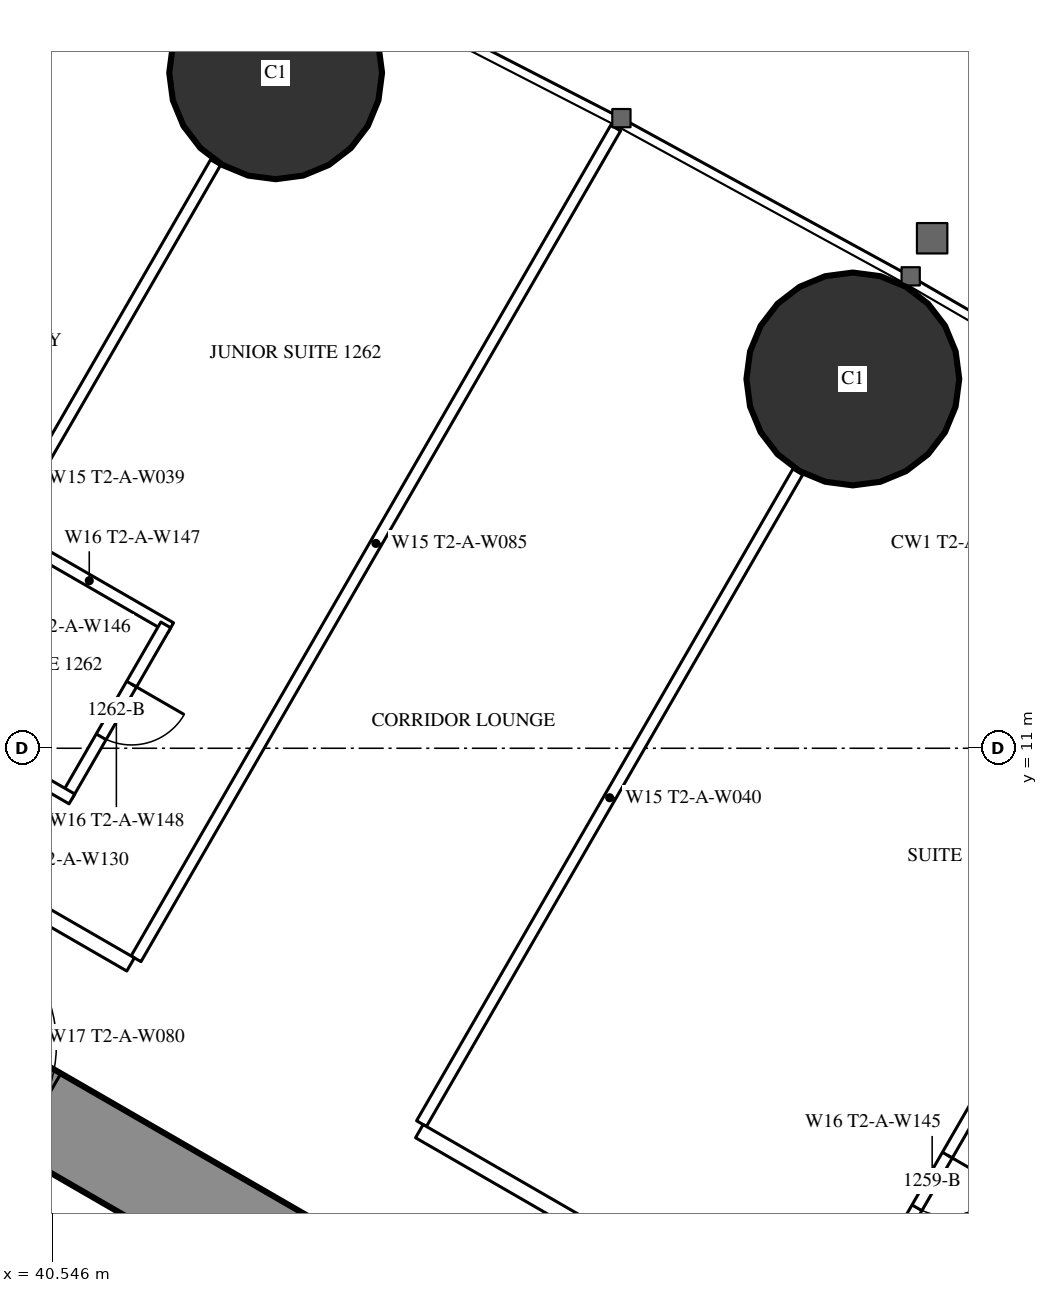
"""IFC4 building model, lengths in metres.
Left out: names, types, materials, properties, quantities, classifications, styles, units other than length and angle.
Written with IfcOpenShell. Run it as: python <this file> out.ifc"""

import sys

from ifc_helpers import new_model, si_unit, direction, frame, frame_2d, origin, origin_2d, place, context, subcontext, project, spatial, rectangle, hollow_circle, extrude, element, fill, save


model = new_model("IFC4")
c1 = context("Model", 3, precision=1e-05, world=origin(), true_north=direction((0.0, 1.0)))
c2 = subcontext(c1, "Body", "Model", "MODEL_VIEW")
j1 = project(units=[si_unit("LENGTHUNIT", "METRE"), si_unit("PLANEANGLEUNIT", "RADIAN")], contexts=[c1])
p1 = place(None, origin())
s1 = spatial("IfcSite", under=j1, at=p1, CompositionType="ELEMENT")
p2 = place(p1, origin())
s2 = spatial("IfcBuilding", under=s1, at=p2, CompositionType="ELEMENT")
p3 = place(p2, frame((0.0, 0.0, 49.5)))
s3 = spatial("IfcBuildingStorey", under=s2, at=p3, CompositionType="ELEMENT", Elevation=49.5)
for number, where, z_axis, x_axis in (
    (1, (51.078, 15.858, 0.0), (0.0, 0.0, 1.0), (1.0, 0.0, 0.0)),
    (2, (43.484, 19.886, 0.0), (0.0, 0.0, 1.0), (1.0, 0.0, 0.0)),
):
    element("IfcColumn", number, at=place(p3, frame(where, z_axis=z_axis, x_axis=x_axis)), inside=s3, PredefinedType="COLUMN", context=c2, shape_type="SweptSolid", body=[
        extrude(hollow_circle(Radius=1.4, WallThickness=0.12, at=origin_2d()), origin(), (0.0, 0.0, 1.0), 3.5),
    ])
p4 = place(p3, frame((27.2, 13.8, 0.0), z_axis=(0.0, 0.0, 1.0), x_axis=(0.866024515034, -0.500001539357, 0.0)))
e3 = element("IfcWall", 3, at=p4, inside=s3, PredefinedType="SHEAR", context=c2, shape_type="SweptSolid", body=[
    extrude(rectangle(XDim=26.907, YDim=1.2, at=frame_2d((13.454, 0.0))), origin(), (0.0, 0.0, 1.0), 3.5),
])
p5 = place(p4, frame((4.6, 0.0, 0.0)))
e4 = element("IfcOpeningElement", 4, at=p5, cuts=e3, PredefinedType="OPENING", context=c2, shape_type="SweptSolid", body=[
    extrude(rectangle(XDim=1.0, YDim=2.2, at=frame_2d((0.5, 1.1))), frame((0.0, 0.61, 0.0), z_axis=(0.0, -1.0, 0.0), x_axis=(1.0, 0.0, 0.0)), (0.0, 0.0, 1.0), 1.22),
])
p6 = place(p4, frame((13.395, 0.0, 0.0)))
e5 = element("IfcOpeningElement", 5, at=p6, cuts=e3, PredefinedType="OPENING", context=c2, shape_type="SweptSolid", body=[
    extrude(rectangle(XDim=1.8, YDim=2.2, at=frame_2d((0.9, 1.1))), frame((0.0, 0.61, 0.0), z_axis=(0.0, -1.0, 0.0), x_axis=(1.0, 0.0, 0.0)), (0.0, 0.0, 1.0), 1.22),
])
p7 = place(p3, frame((37.895, 10.396, 0.0), z_axis=(0.0, 0.0, 1.0), x_axis=(0.499995616528, 0.866027934568, 0.0)))
e6 = element("IfcWall", 6, at=p7, inside=s3, PredefinedType="PARTITIONING", context=c2, shape_type="SweptSolid", body=[
    extrude(rectangle(XDim=9.593, YDim=0.15, at=frame_2d((4.797, 0.0))), origin(), (0.0, 0.0, 1.0), 2.25),
])
p8 = place(p3, frame((41.647, 8.23, 0.0), z_axis=(0.0, 0.0, 1.0), x_axis=(0.49998590462, 0.866033541603, 0.0)))
e7 = element("IfcWall", 7, at=p8, inside=s3, PredefinedType="PARTITIONING", context=c2, shape_type="SweptSolid", body=[
    extrude(rectangle(XDim=12.621, YDim=0.15, at=frame_2d((6.311, 0.0))), origin(), (0.0, 0.0, 1.0), 3.25),
])
p9 = place(p3, frame((45.403, 6.062, 0.0), z_axis=(0.0, 0.0, 1.0), x_axis=(0.500013434677, 0.866017647131, 0.0)))
e8 = element("IfcWall", 8, at=p9, inside=s3, PredefinedType="PARTITIONING", context=c2, shape_type="SweptSolid", body=[
    extrude(rectangle(XDim=9.902, YDim=0.15, at=frame_2d((4.951, 0.0))), origin(), (0.0, 0.0, 1.0), 2.25),
])
p10 = place(p3, frame((36.834, 10.894, 0.0), z_axis=(0.0, 0.0, 1.0), x_axis=(0.866031136856, -0.499990069898, 0.0)))
e9 = element("IfcWall", 9, at=p10, inside=s3, PredefinedType="PARTITIONING", context=c2, shape_type="SweptSolid", body=[
    extrude(rectangle(XDim=5.475, YDim=0.2, at=frame_2d((2.738, 0.0))), origin(), (0.0, 0.0, 1.0), 3.25),
])
p11 = place(p10, frame((1.542, 0.0, 0.0)))
e10 = element("IfcOpeningElement", 10, at=p11, cuts=e9, PredefinedType="OPENING", context=c2, shape_type="SweptSolid", body=[
    extrude(rectangle(XDim=0.95, YDim=2.2, at=frame_2d((0.475, 1.1))), frame((0.0, 0.11, 0.0), z_axis=(0.0, -1.0, 0.0), x_axis=(1.0, 0.0, 0.0)), (0.0, 0.0, 1.0), 0.22),
])
p12 = place(p10, frame((0.246, 0.0, 0.0)))
e11 = element("IfcOpeningElement", 11, at=p12, cuts=e9, PredefinedType="OPENING", context=c2, shape_type="SweptSolid", body=[
    extrude(rectangle(XDim=0.9, YDim=2.2, at=frame_2d((0.45, 1.1))), frame((0.0, 0.11, 0.0), z_axis=(0.0, -1.0, 0.0), x_axis=(1.0, 0.0, 0.0)), (0.0, 0.0, 1.0), 0.22),
])
p13 = place(p3, frame((45.375, 5.963, 0.0), z_axis=(0.0, 0.0, 1.0), x_axis=(0.86603164725, -0.499989185844, 0.0)))
e12 = element("IfcWall", 12, at=p13, inside=s3, PredefinedType="PARTITIONING", context=c2, shape_type="SweptSolid", body=[
    extrude(rectangle(XDim=11.805, YDim=0.2, at=frame_2d((5.903, 0.0))), origin(), (0.0, 0.0, 1.0), 3.25),
])
p14 = place(p13, frame((9.024, 0.0, 0.0)))
e13 = element("IfcOpeningElement", 13, at=p14, cuts=e12, PredefinedType="OPENING", context=c2, shape_type="SweptSolid", body=[
    extrude(rectangle(XDim=0.95, YDim=2.2, at=frame_2d((0.475, 1.1))), frame((0.0, 0.11, 0.0), z_axis=(0.0, -1.0, 0.0), x_axis=(1.0, 0.0, 0.0)), (0.0, 0.0, 1.0), 0.22),
])
p15 = place(p13, frame((7.324, 0.0, 0.0)))
e14 = element("IfcOpeningElement", 14, at=p15, cuts=e12, PredefinedType="OPENING", context=c2, shape_type="SweptSolid", body=[
    extrude(rectangle(XDim=0.95, YDim=2.2, at=frame_2d((0.475, 1.1))), frame((0.0, 0.11, 0.0), z_axis=(0.0, -1.0, 0.0), x_axis=(1.0, 0.0, 0.0)), (0.0, 0.0, 1.0), 0.22),
])
p16 = place(p3, frame((51.471, 4.175, 0.0), z_axis=(0.0, 0.0, 1.0), x_axis=(0.500006934395, 0.866021400173, 0.0)))
e15 = element("IfcWall", 15, at=p16, inside=s3, PredefinedType="PARTITIONING", context=c2, shape_type="SweptSolid", body=[
    extrude(rectangle(XDim=2.6, YDim=0.15, at=frame_2d((1.3, 0.0))), origin(), (0.0, 0.0, 1.0), 3.25),
])
p17 = place(p16, frame((0.9, 0.0, 0.0)))
e16 = element("IfcOpeningElement", 16, at=p17, cuts=e15, PredefinedType="OPENING", context=c2, shape_type="SweptSolid", body=[
    extrude(rectangle(XDim=0.8, YDim=2.2, at=frame_2d((0.4, 1.1))), frame((0.0, 0.085, 0.0), z_axis=(0.0, -1.0, 0.0), x_axis=(1.0, 0.0, 0.0)), (0.0, 0.0, 1.0), 0.17),
])
p18 = place(p3, frame((39.96, 13.823, 0.0), z_axis=(0.0, 0.0, 1.0), x_axis=(0.866006523861, -0.500032699561, 0.0)))
e17 = element("IfcWall", 17, at=p18, inside=s3, PredefinedType="PARTITIONING", context=c2, shape_type="SweptSolid", body=[
    extrude(rectangle(XDim=2.475, YDim=0.15, at=frame_2d((1.237, 0.0))), origin(), (0.0, 0.0, 1.0), 3.25),
])
p19 = place(p3, frame((40.739, 10.371, 0.0), z_axis=(0.0, 0.0, 1.0), x_axis=(0.500006934395, 0.866021400173, 0.0)))
e18 = element("IfcWall", 18, at=p19, inside=s3, PredefinedType="PARTITIONING", context=c2, shape_type="SweptSolid", body=[
    extrude(rectangle(XDim=2.6, YDim=0.15, at=frame_2d((1.3, 0.0))), origin(), (0.0, 0.0, 1.0), 3.25),
])
p20 = place(p19, frame((0.9, 0.0, 0.0)))
e19 = element("IfcOpeningElement", 19, at=p20, cuts=e18, PredefinedType="OPENING", context=c2, shape_type="SweptSolid", body=[
    extrude(rectangle(XDim=0.8, YDim=2.2, at=frame_2d((0.4, 1.1))), frame((0.0, 0.085, 0.0), z_axis=(0.0, -1.0, 0.0), x_axis=(1.0, 0.0, 0.0)), (0.0, 0.0, 1.0), 0.17),
])
p21 = place(p3, frame((38.66, 11.571, 0.0), z_axis=(0.0, 0.0, 1.0), x_axis=(0.866006523861, -0.500032699561, 0.0)))
e20 = element("IfcWall", 20, at=p21, inside=s3, PredefinedType="PARTITIONING", context=c2, shape_type="SweptSolid", body=[
    extrude(rectangle(XDim=2.475, YDim=0.15, at=frame_2d((1.237, 0.0))), origin(), (0.0, 0.0, 1.0), 3.25),
])
p22 = place(p17, origin())
e21 = element("IfcDoor", 21, at=p22, inside=s3, OperationType="SINGLE_SWING_RIGHT", PredefinedType="DOOR", context=c2, shape_type="SweptSolid", body=[
    extrude(rectangle(XDim=0.8, YDim=2.2, at=frame_2d((0.4, 1.1))), frame((0.0, 0.025, 0.0), z_axis=(0.0, -1.0, 0.0), x_axis=(1.0, 0.0, 0.0)), (0.0, 0.0, 1.0), 0.05),
])
fill(e16, e21)
p23 = place(p20, origin())
e22 = element("IfcDoor", 22, at=p23, inside=s3, OperationType="SINGLE_SWING_RIGHT", PredefinedType="DOOR", context=c2, shape_type="SweptSolid", body=[
    extrude(rectangle(XDim=0.8, YDim=2.2, at=frame_2d((0.4, 1.1))), frame((0.0, 0.025, 0.0), z_axis=(0.0, -1.0, 0.0), x_axis=(1.0, 0.0, 0.0)), (0.0, 0.0, 1.0), 0.05),
])
fill(e19, e22)
save(model, sys.argv[1])
